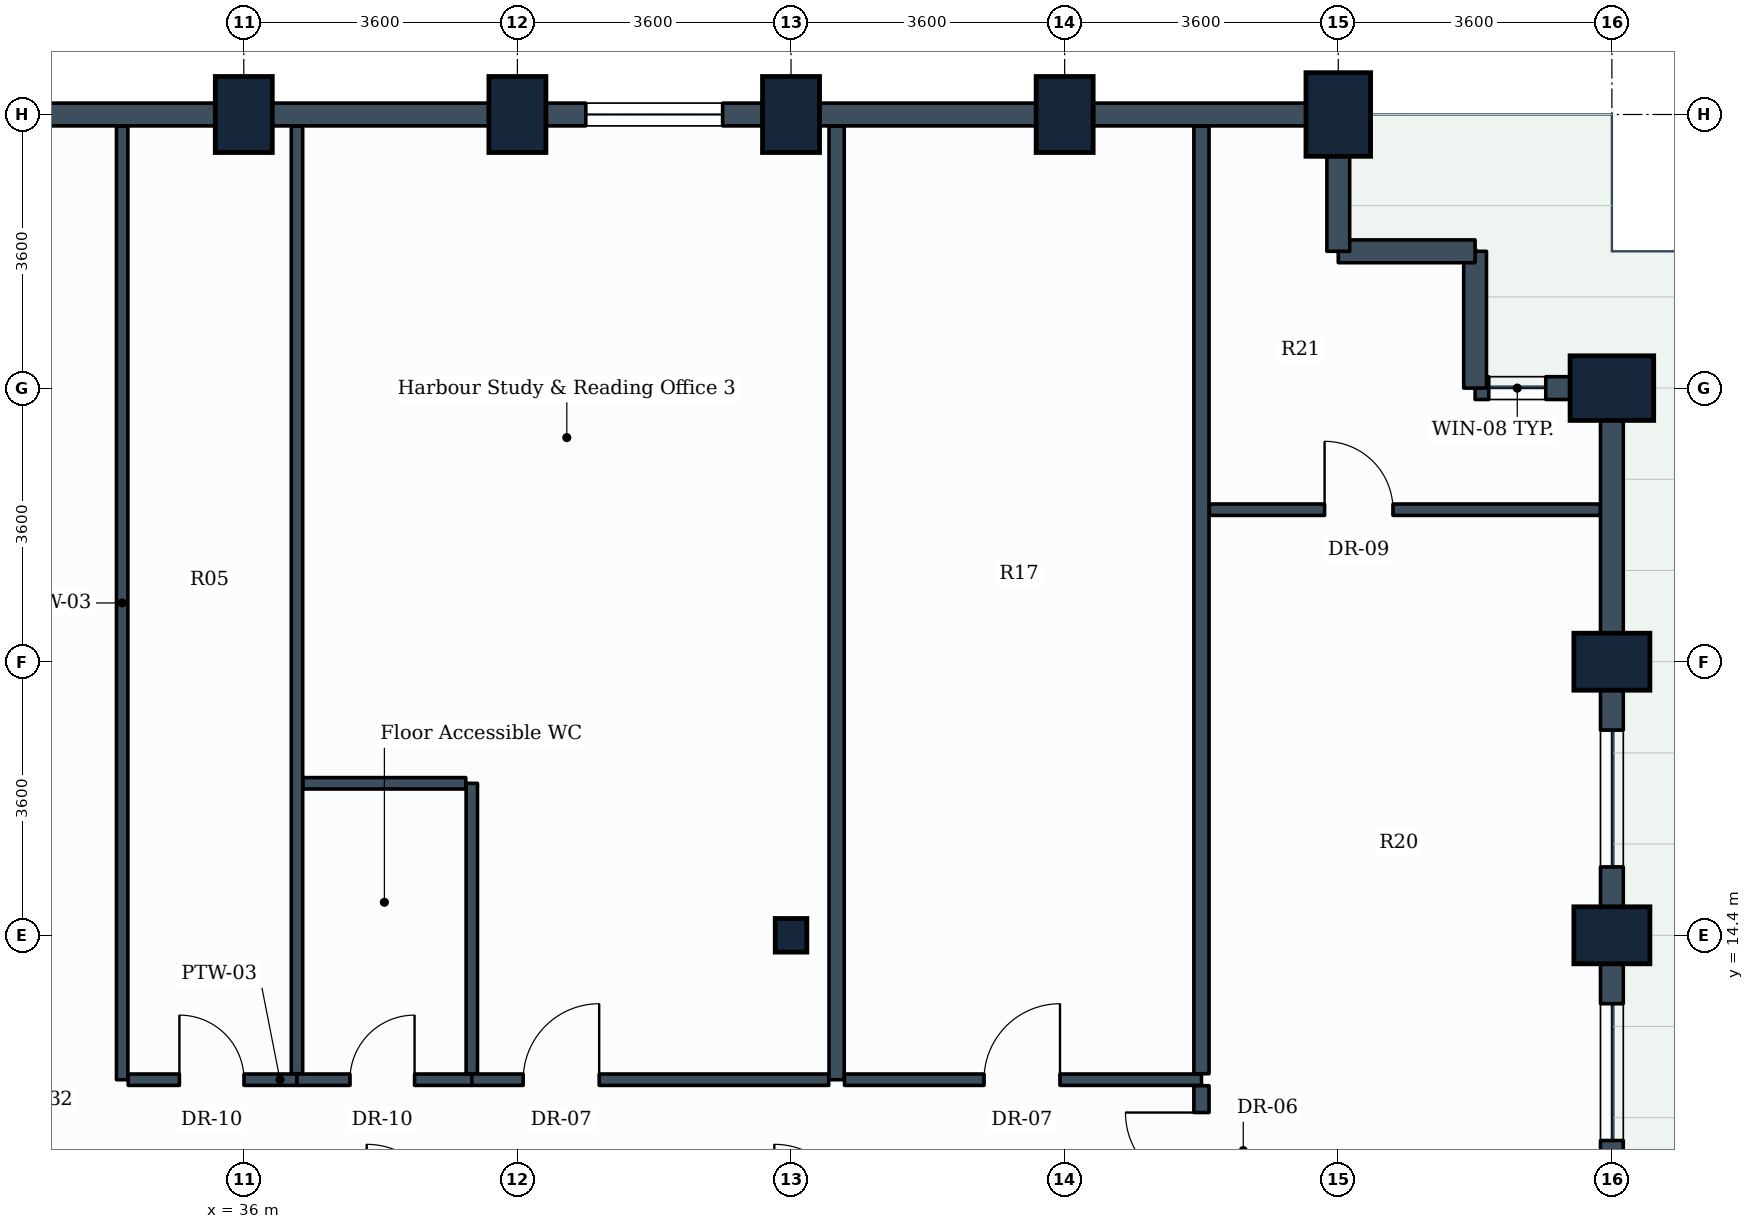
"""IFC4 building model, lengths in metres.
Left out: names, types, materials, properties, quantities, classifications, styles, units other than length and angle.
Written with IfcOpenShell. Run it as: python <this file> out.ifc"""

import sys

from ifc_helpers import new_model, si_unit, direction, frame, frame_2d, origin, origin_2d, place, context, subcontext, project, spatial, rectangle, i_section, extrude, element, fill, save


model = new_model("IFC4")
c1 = context("Model", 3, precision=1e-05, world=origin(), true_north=direction((0.0, 1.0)))
c2 = subcontext(c1, "Body", "Model", "MODEL_VIEW")
j1 = project(units=[si_unit("LENGTHUNIT", "METRE"), si_unit("PLANEANGLEUNIT", "RADIAN")], contexts=[c1])
p1 = place(None, origin())
s1 = spatial("IfcSite", under=j1, at=p1, CompositionType="ELEMENT")
p2 = place(p1, origin())
s2 = spatial("IfcBuilding", under=s1, at=p2, CompositionType="ELEMENT")
p3 = place(p2, frame((0.0, 0.0, 127.6)))
s3 = spatial("IfcBuildingStorey", under=s2, at=p3, CompositionType="ELEMENT", Elevation=127.6)
for number, where, z_axis, x_axis in (
    (1, (36.0, 25.2, 0.0), (0.0, 0.0, 1.0), (1.0, 0.0, 0.0)),
    (2, (39.6, 25.2, 0.0), (0.0, 0.0, 1.0), (1.0, 0.0, 0.0)),
):
    element("IfcColumn", number, at=place(p3, frame(where, z_axis=z_axis, x_axis=x_axis)), inside=s3, PredefinedType="COLUMN", context=c2, shape_type="SweptSolid", body=[
        extrude(rectangle(XDim=0.75, YDim=1.0, at=origin_2d()), origin(), (0.0, 0.0, 1.0), 3.8),
    ])
p4 = place(p3, frame((43.2, 14.4, 0.0), z_axis=(0.0, 0.0, 1.0), x_axis=(1.0, 0.0, 0.0)))
e3 = element("IfcColumn", 3, at=p4, inside=s3, PredefinedType="COLUMN", context=c2, shape_type="SweptSolid", body=[
    extrude(i_section(OverallWidth=0.416, OverallDepth=0.442, WebThickness=0.025, FlangeThickness=0.041, FilletRadius=0.015, at=origin_2d()), origin(), (0.0, 0.0, 1.0), 3.8),
])
for number, where, z_axis, x_axis in (
    (4, (43.2, 25.2, 0.0), (0.0, 0.0, 1.0), (1.0, 0.0, 0.0)),
    (5, (46.8, 25.2, 0.0), (0.0, 0.0, 1.0), (1.0, 0.0, 0.0)),
):
    element("IfcColumn", number, at=place(p3, frame(where, z_axis=z_axis, x_axis=x_axis)), inside=s3, PredefinedType="COLUMN", context=c2, shape_type="SweptSolid", body=[
        extrude(rectangle(XDim=0.75, YDim=1.0, at=origin_2d()), origin(), (0.0, 0.0, 1.0), 3.8),
    ])
p5 = place(p3, frame((50.4, 25.2, 0.0), z_axis=(0.0, 0.0, 1.0), x_axis=(1.0, 0.0, 0.0)))
e6 = element("IfcColumn", 6, at=p5, inside=s3, PredefinedType="COLUMN", context=c2, shape_type="SweptSolid", body=[
    extrude(rectangle(XDim=0.85, YDim=1.1, at=origin_2d()), origin(), (0.0, 0.0, 1.0), 3.8),
])
for number, where, z_axis, x_axis in (
    (7, (54.0, 14.4, 0.0), (0.0, 0.0, 1.0), (0.0, 1.0, 0.0)),
    (8, (54.0, 18.0, 0.0), (0.0, 0.0, 1.0), (0.0, 1.0, 0.0)),
):
    element("IfcColumn", number, at=place(p3, frame(where, z_axis=z_axis, x_axis=x_axis)), inside=s3, PredefinedType="COLUMN", context=c2, shape_type="SweptSolid", body=[
        extrude(rectangle(XDim=0.75, YDim=1.0, at=origin_2d()), origin(), (0.0, 0.0, 1.0), 3.8),
    ])
p6 = place(p3, frame((54.0, 21.6, 0.0), z_axis=(0.0, 0.0, 1.0), x_axis=(0.0, 1.0, 0.0)))
e9 = element("IfcColumn", 9, at=p6, inside=s3, PredefinedType="COLUMN", context=c2, shape_type="SweptSolid", body=[
    extrude(rectangle(XDim=0.85, YDim=1.1, at=origin_2d()), origin(), (0.0, 0.0, 1.0), 3.8),
])
p7 = place(p3, frame((54.0, 14.4, 0.0), z_axis=(0.0, 0.0, 1.0), x_axis=(0.0, -1.0, 0.0)))
e10 = element("IfcWall", 10, at=p7, inside=s3, PredefinedType="STANDARD", context=c2, shape_type="SweptSolid", body=[
    extrude(rectangle(XDim=3.6, YDim=0.3, at=frame_2d((1.8, 0.0))), origin(), (0.0, 0.0, 1.0), 2.93),
])
p8 = place(p7, frame((0.9, 0.0, 0.85)))
e11 = element("IfcOpeningElement", 11, at=p8, cuts=e10, PredefinedType="OPENING", context=c2, shape_type="SweptSolid", body=[
    extrude(rectangle(XDim=1.8, YDim=1.35, at=frame_2d((0.9, 0.675))), frame((0.0, 0.16, 0.0), z_axis=(0.0, -1.0, 0.0), x_axis=(1.0, 0.0, 0.0)), (0.0, 0.0, 1.0), 0.32),
])
p9 = place(p3, frame((54.0, 18.0, 0.0), z_axis=(0.0, 0.0, 1.0), x_axis=(0.0, -1.0, 0.0)))
e12 = element("IfcWall", 12, at=p9, inside=s3, PredefinedType="STANDARD", context=c2, shape_type="SweptSolid", body=[
    extrude(rectangle(XDim=3.6, YDim=0.3, at=frame_2d((1.8, 0.0))), origin(), (0.0, 0.0, 1.0), 2.93),
])
p10 = place(p9, frame((0.9, 0.0, 0.85)))
e13 = element("IfcOpeningElement", 13, at=p10, cuts=e12, PredefinedType="OPENING", context=c2, shape_type="SweptSolid", body=[
    extrude(rectangle(XDim=1.8, YDim=1.35, at=frame_2d((0.9, 0.675))), frame((0.0, 0.16, 0.0), z_axis=(0.0, -1.0, 0.0), x_axis=(1.0, 0.0, 0.0)), (0.0, 0.0, 1.0), 0.32),
])
p11 = place(p3, frame((54.0, 21.6, 0.0), z_axis=(0.0, 0.0, 1.0), x_axis=(0.0, -1.0, 0.0)))
e14 = element("IfcWall", 14, at=p11, inside=s3, PredefinedType="STANDARD", context=c2, shape_type="SweptSolid", body=[
    extrude(rectangle(XDim=3.6, YDim=0.3, at=frame_2d((1.8, 0.0))), origin(), (0.0, 0.0, 1.0), 2.93),
])
p12 = place(p3, frame((52.2, 21.6, 0.0), z_axis=(0.0, 0.0, 1.0), x_axis=(1.0, 0.0, 0.0)))
e15 = element("IfcWall", 15, at=p12, inside=s3, PredefinedType="STANDARD", context=c2, shape_type="SweptSolid", body=[
    extrude(rectangle(XDim=1.8, YDim=0.3, at=frame_2d((0.9, 0.0))), origin(), (0.0, 0.0, 1.0), 2.93),
])
p13 = place(p12, frame((0.18, 0.0, 0.85)))
e16 = element("IfcOpeningElement", 16, at=p13, cuts=e15, PredefinedType="OPENING", context=c2, shape_type="SweptSolid", body=[
    extrude(rectangle(XDim=0.75, YDim=1.05, at=frame_2d((0.375, 0.525))), frame((0.0, 0.16, 0.0), z_axis=(0.0, -1.0, 0.0), x_axis=(1.0, 0.0, 0.0)), (0.0, 0.0, 1.0), 0.32),
])
p14 = place(p3, frame((52.2, 23.4, 0.0), z_axis=(0.0, 0.0, 1.0), x_axis=(0.0, -1.0, 0.0)))
e17 = element("IfcWall", 17, at=p14, inside=s3, PredefinedType="STANDARD", context=c2, shape_type="SweptSolid", body=[
    extrude(rectangle(XDim=1.8, YDim=0.3, at=frame_2d((0.9, 0.0))), origin(), (0.0, 0.0, 1.0), 3.535),
])
p15 = place(p3, frame((50.4, 23.4, 0.0), z_axis=(0.0, 0.0, 1.0), x_axis=(1.0, 0.0, 0.0)))
e18 = element("IfcWall", 18, at=p15, inside=s3, PredefinedType="STANDARD", context=c2, shape_type="SweptSolid", body=[
    extrude(rectangle(XDim=1.8, YDim=0.3, at=frame_2d((0.9, 0.0))), origin(), (0.0, 0.0, 1.0), 3.535),
])
p16 = place(p3, frame((50.4, 25.2, 0.0), z_axis=(0.0, 0.0, 1.0), x_axis=(0.0, -1.0, 0.0)))
e19 = element("IfcWall", 19, at=p16, inside=s3, PredefinedType="STANDARD", context=c2, shape_type="SweptSolid", body=[
    extrude(rectangle(XDim=1.8, YDim=0.3, at=frame_2d((0.9, 0.0))), origin(), (0.0, 0.0, 1.0), 2.93),
])
p17 = place(p3, frame((46.8, 25.2, 0.0), z_axis=(0.0, 0.0, 1.0), x_axis=(1.0, 0.0, 0.0)))
e20 = element("IfcWall", 20, at=p17, inside=s3, PredefinedType="STANDARD", context=c2, shape_type="SweptSolid", body=[
    extrude(rectangle(XDim=3.6, YDim=0.3, at=frame_2d((1.8, 0.0))), origin(), (0.0, 0.0, 1.0), 2.93),
])
p18 = place(p3, frame((43.2, 25.2, 0.0), z_axis=(0.0, 0.0, 1.0), x_axis=(1.0, 0.0, 0.0)))
e21 = element("IfcWall", 21, at=p18, inside=s3, PredefinedType="STANDARD", context=c2, shape_type="SweptSolid", body=[
    extrude(rectangle(XDim=3.6, YDim=0.3, at=frame_2d((1.8, 0.0))), origin(), (0.0, 0.0, 1.0), 2.93),
])
p19 = place(p3, frame((39.6, 25.2, 0.0), z_axis=(0.0, 0.0, 1.0), x_axis=(1.0, 0.0, 0.0)))
e22 = element("IfcWall", 22, at=p19, inside=s3, PredefinedType="STANDARD", context=c2, shape_type="SweptSolid", body=[
    extrude(rectangle(XDim=3.6, YDim=0.3, at=frame_2d((1.8, 0.0))), origin(), (0.0, 0.0, 1.0), 2.93),
])
p20 = place(p19, frame((0.9, 0.0, 0.85)))
e23 = element("IfcOpeningElement", 23, at=p20, cuts=e22, PredefinedType="OPENING", context=c2, shape_type="SweptSolid", body=[
    extrude(rectangle(XDim=1.8, YDim=1.35, at=frame_2d((0.9, 0.675))), frame((0.0, 0.16, 0.0), z_axis=(0.0, -1.0, 0.0), x_axis=(1.0, 0.0, 0.0)), (0.0, 0.0, 1.0), 0.32),
])
for number, where, z_axis, x_axis in (
    (24, (36.0, 25.2, 0.0), (0.0, 0.0, 1.0), (1.0, 0.0, 0.0)),
    (25, (32.4, 25.2, 0.0), (0.0, 0.0, 1.0), (1.0, 0.0, 0.0)),
):
    element("IfcWall", number, at=place(p3, frame(where, z_axis=z_axis, x_axis=x_axis)), inside=s3, PredefinedType="STANDARD", context=c2, shape_type="SweptSolid", body=[
        extrude(rectangle(XDim=3.6, YDim=0.3, at=frame_2d((1.8, 0.0))), origin(), (0.0, 0.0, 1.0), 2.93),
    ])
p21 = place(p3, frame((34.4, 12.5, 0.0), z_axis=(0.0, 0.0, 1.0), x_axis=(0.0, 1.0, 0.0)))
e26 = element("IfcWall", 26, at=p21, inside=s3, PredefinedType="PARTITIONING", context=c2, shape_type="SweptSolid", body=[
    extrude(rectangle(XDim=12.546, YDim=0.15, at=frame_2d((6.273, 0.0))), origin(), (0.0, 0.0, 1.0), 2.93),
])
p22 = place(p3, frame((34.479, 12.5, 0.0), z_axis=(0.0, 0.0, 1.0), x_axis=(1.0, 0.0, 0.0)))
e27 = element("IfcWall", 27, at=p22, inside=s3, PredefinedType="PARTITIONING", context=c2, shape_type="SweptSolid", body=[
    extrude(rectangle(XDim=2.221, YDim=0.15, at=frame_2d((1.11, 0.0))), origin(), (0.0, 0.0, 1.0), 3.22),
])
p23 = place(p22, frame((0.674, 0.0, 0.0)))
e28 = element("IfcOpeningElement", 28, at=p23, cuts=e27, PredefinedType="OPENING", context=c2, shape_type="SweptSolid", body=[
    extrude(rectangle(XDim=0.85, YDim=2.1, at=frame_2d((0.425, 1.05))), frame((0.0, 0.085, 0.0), z_axis=(0.0, -1.0, 0.0), x_axis=(1.0, 0.0, 0.0)), (0.0, 0.0, 1.0), 0.17),
])
p24 = place(p3, frame((36.7, 12.579, 0.0), z_axis=(0.0, 0.0, 1.0), x_axis=(0.0, 1.0, 0.0)))
e29 = element("IfcWall", 29, at=p24, inside=s3, PredefinedType="PARTITIONING", context=c2, shape_type="SweptSolid", body=[
    extrude(rectangle(XDim=12.467, YDim=0.15, at=frame_2d((6.233, 0.0))), origin(), (0.0, 0.0, 1.0), 2.93),
])
p25 = place(p3, frame((36.7, 12.5, 0.0), z_axis=(0.0, 0.0, 1.0), x_axis=(1.0, 0.0, 0.0)))
e30 = element("IfcWall", 30, at=p25, inside=s3, PredefinedType="PARTITIONING", context=c2, shape_type="SweptSolid", body=[
    extrude(rectangle(XDim=2.3, YDim=0.15, at=frame_2d((1.15, 0.0))), origin(), (0.0, 0.0, 1.0), 3.535),
])
p26 = place(p25, frame((0.697, 0.0, 0.0)))
e31 = element("IfcOpeningElement", 31, at=p26, cuts=e30, PredefinedType="OPENING", context=c2, shape_type="SweptSolid", body=[
    extrude(rectangle(XDim=0.85, YDim=2.1, at=frame_2d((0.425, 1.05))), frame((0.0, 0.085, 0.0), z_axis=(0.0, -1.0, 0.0), x_axis=(1.0, 0.0, 0.0)), (0.0, 0.0, 1.0), 0.17),
])
p27 = place(p3, frame((39.0, 12.579, 0.0), z_axis=(0.0, 0.0, 1.0), x_axis=(0.0, 1.0, 0.0)))
e32 = element("IfcWall", 32, at=p27, inside=s3, PredefinedType="PARTITIONING", context=c2, shape_type="SweptSolid", body=[
    extrude(rectangle(XDim=3.821, YDim=0.15, at=frame_2d((1.91, 0.0))), origin(), (0.0, 0.0, 1.0), 3.17),
])
p28 = place(p3, frame((36.779, 16.4, 0.0), z_axis=(0.0, 0.0, 1.0), x_axis=(1.0, 0.0, 0.0)))
e33 = element("IfcWall", 33, at=p28, inside=s3, PredefinedType="PARTITIONING", context=c2, shape_type="SweptSolid", body=[
    extrude(rectangle(XDim=2.142, YDim=0.15, at=frame_2d((1.071, 0.0))), origin(), (0.0, 0.0, 1.0), 3.535),
])
p29 = place(p3, frame((43.8, 12.5, 0.0), z_axis=(0.0, 0.0, 1.0), x_axis=(0.0, 1.0, 0.0)))
e34 = element("IfcWall", 34, at=p29, inside=s3, PredefinedType="PARTITIONING", context=c2, shape_type="SweptSolid", body=[
    extrude(rectangle(XDim=12.546, YDim=0.2, at=frame_2d((6.273, 0.0))), origin(), (0.0, 0.0, 1.0), 2.93),
])
p30 = place(p3, frame((39.0, 12.5, 0.0), z_axis=(0.0, 0.0, 1.0), x_axis=(1.0, 0.0, 0.0)))
e35 = element("IfcWall", 35, at=p30, inside=s3, PredefinedType="PARTITIONING", context=c2, shape_type="SweptSolid", body=[
    extrude(rectangle(XDim=4.696, YDim=0.15, at=frame_2d((2.348, 0.0))), origin(), (0.0, 0.0, 1.0), 3.17),
])
p31 = place(p30, frame((0.676, 0.0, 0.0)))
e36 = element("IfcOpeningElement", 36, at=p31, cuts=e35, PredefinedType="OPENING", context=c2, shape_type="SweptSolid", body=[
    extrude(rectangle(XDim=1.0, YDim=2.1, at=frame_2d((0.5, 1.05))), frame((0.0, 0.085, 0.0), z_axis=(0.0, -1.0, 0.0), x_axis=(1.0, 0.0, 0.0)), (0.0, 0.0, 1.0), 0.17),
])
p32 = place(p3, frame((43.904, 12.5, 0.0), z_axis=(0.0, 0.0, 1.0), x_axis=(1.0, 0.0, 0.0)))
e37 = element("IfcWall", 37, at=p32, inside=s3, PredefinedType="PARTITIONING", context=c2, shape_type="SweptSolid", body=[
    extrude(rectangle(XDim=4.696, YDim=0.15, at=frame_2d((2.348, 0.0))), origin(), (0.0, 0.0, 1.0), 3.17),
])
p33 = place(p32, frame((1.835, 0.0, 0.0)))
e38 = element("IfcOpeningElement", 38, at=p33, cuts=e37, PredefinedType="OPENING", context=c2, shape_type="SweptSolid", body=[
    extrude(rectangle(XDim=1.0, YDim=2.1, at=frame_2d((0.5, 1.05))), frame((0.0, 0.085, 0.0), z_axis=(0.0, -1.0, 0.0), x_axis=(1.0, 0.0, 0.0)), (0.0, 0.0, 1.0), 0.17),
])
p34 = place(p3, frame((48.6, 12.579, 0.0), z_axis=(0.0, 0.0, 1.0), x_axis=(0.0, 1.0, 0.0)))
e39 = element("IfcWall", 39, at=p34, inside=s3, PredefinedType="PARTITIONING", context=c2, shape_type="SweptSolid", body=[
    extrude(rectangle(XDim=12.467, YDim=0.2, at=frame_2d((6.233, 0.0))), origin(), (0.0, 0.0, 1.0), 2.93),
])
p35 = place(p3, frame((48.6, 10.754, 0.0), z_axis=(0.0, 0.0, 1.0), x_axis=(0.0, 1.0, 0.0)))
e40 = element("IfcWall", 40, at=p35, inside=s3, PredefinedType="PARTITIONING", context=c2, shape_type="SweptSolid", body=[
    extrude(rectangle(XDim=1.667, YDim=0.2, at=frame_2d((0.833, 0.0))), origin(), (0.0, 0.0, 1.0), 3.535),
])
p36 = place(p35, frame((0.314, 0.0, 0.0)))
e41 = element("IfcOpeningElement", 41, at=p36, cuts=e40, PredefinedType="OPENING", context=c2, shape_type="SweptSolid", body=[
    extrude(rectangle(XDim=1.0, YDim=2.1, at=frame_2d((0.5, 1.05))), frame((0.0, 0.11, 0.0), z_axis=(0.0, -1.0, 0.0), x_axis=(1.0, 0.0, 0.0)), (0.0, 0.0, 1.0), 0.22),
])
p37 = place(p3, frame((48.704, 20.0, 0.0), z_axis=(0.0, 0.0, 1.0), x_axis=(1.0, 0.0, 0.0)))
e42 = element("IfcWall", 42, at=p37, inside=s3, PredefinedType="PARTITIONING", context=c2, shape_type="SweptSolid", body=[
    extrude(rectangle(XDim=5.142, YDim=0.15, at=frame_2d((2.571, 0.0))), origin(), (0.0, 0.0, 1.0), 2.93),
])
p38 = place(p37, frame((1.516, 0.0, 0.0)))
e43 = element("IfcOpeningElement", 43, at=p38, cuts=e42, PredefinedType="OPENING", context=c2, shape_type="SweptSolid", body=[
    extrude(rectangle(XDim=0.9, YDim=2.1, at=frame_2d((0.45, 1.05))), frame((0.0, 0.085, 0.0), z_axis=(0.0, -1.0, 0.0), x_axis=(1.0, 0.0, 0.0)), (0.0, 0.0, 1.0), 0.17),
])
p39 = place(p8, origin())
e44 = element("IfcWindow", 44, at=p39, inside=s3, PartitioningType="SINGLE_PANEL", PredefinedType="WINDOW", context=c2, shape_type="SweptSolid", body=[
    extrude(rectangle(XDim=1.8, YDim=1.35, at=frame_2d((0.9, 0.675))), frame((0.0, 0.03, 0.0), z_axis=(0.0, -1.0, 0.0), x_axis=(1.0, 0.0, 0.0)), (0.0, 0.0, 1.0), 0.06),
])
fill(e11, e44)
p40 = place(p10, origin())
e45 = element("IfcWindow", 45, at=p40, inside=s3, PartitioningType="SINGLE_PANEL", PredefinedType="WINDOW", context=c2, shape_type="SweptSolid", body=[
    extrude(rectangle(XDim=1.8, YDim=1.35, at=frame_2d((0.9, 0.675))), frame((0.0, 0.03, 0.0), z_axis=(0.0, -1.0, 0.0), x_axis=(1.0, 0.0, 0.0)), (0.0, 0.0, 1.0), 0.06),
])
fill(e13, e45)
p41 = place(p20, origin())
e46 = element("IfcWindow", 46, at=p41, inside=s3, PartitioningType="SINGLE_PANEL", PredefinedType="WINDOW", context=c2, shape_type="SweptSolid", body=[
    extrude(rectangle(XDim=1.8, YDim=1.35, at=frame_2d((0.9, 0.675))), frame((0.0, 0.03, 0.0), z_axis=(0.0, -1.0, 0.0), x_axis=(1.0, 0.0, 0.0)), (0.0, 0.0, 1.0), 0.06),
])
fill(e23, e46)
p42 = place(p23, origin())
e47 = element("IfcDoor", 47, at=p42, inside=s3, OperationType="SINGLE_SWING_LEFT", PredefinedType="DOOR", context=c2, shape_type="SweptSolid", body=[
    extrude(rectangle(XDim=0.85, YDim=2.1, at=frame_2d((0.425, 1.05))), frame((0.0, 0.025, 0.0), z_axis=(0.0, -1.0, 0.0), x_axis=(1.0, 0.0, 0.0)), (0.0, 0.0, 1.0), 0.05),
])
fill(e28, e47)
p43 = place(p26, origin())
e48 = element("IfcDoor", 48, at=p43, inside=s3, OperationType="SINGLE_SWING_RIGHT", PredefinedType="DOOR", context=c2, shape_type="SweptSolid", body=[
    extrude(rectangle(XDim=0.85, YDim=2.1, at=frame_2d((0.425, 1.05))), frame((0.0, 0.025, 0.0), z_axis=(0.0, -1.0, 0.0), x_axis=(1.0, 0.0, 0.0)), (0.0, 0.0, 1.0), 0.05),
])
fill(e31, e48)
p44 = place(p31, origin())
e49 = element("IfcDoor", 49, at=p44, inside=s3, OperationType="SINGLE_SWING_RIGHT", PredefinedType="DOOR", context=c2, shape_type="SweptSolid", body=[
    extrude(rectangle(XDim=1.0, YDim=2.1, at=frame_2d((0.5, 1.05))), frame((0.0, 0.025, 0.0), z_axis=(0.0, -1.0, 0.0), x_axis=(1.0, 0.0, 0.0)), (0.0, 0.0, 1.0), 0.05),
])
fill(e36, e49)
p45 = place(p33, origin())
e50 = element("IfcDoor", 50, at=p45, inside=s3, OperationType="SINGLE_SWING_RIGHT", PredefinedType="DOOR", context=c2, shape_type="SweptSolid", body=[
    extrude(rectangle(XDim=1.0, YDim=2.1, at=frame_2d((0.5, 1.05))), frame((0.0, 0.025, 0.0), z_axis=(0.0, -1.0, 0.0), x_axis=(1.0, 0.0, 0.0)), (0.0, 0.0, 1.0), 0.05),
])
fill(e38, e50)
p46 = place(p36, origin())
e51 = element("IfcDoor", 51, at=p46, inside=s3, OperationType="SINGLE_SWING_RIGHT", PredefinedType="DOOR", context=c2, shape_type="SweptSolid", body=[
    extrude(rectangle(XDim=1.0, YDim=2.1, at=frame_2d((0.5, 1.05))), frame((0.0, 0.025, 0.0), z_axis=(0.0, -1.0, 0.0), x_axis=(1.0, 0.0, 0.0)), (0.0, 0.0, 1.0), 0.05),
])
fill(e41, e51)
p47 = place(p38, origin())
e52 = element("IfcDoor", 52, at=p47, inside=s3, OperationType="SINGLE_SWING_LEFT", PredefinedType="DOOR", context=c2, shape_type="SweptSolid", body=[
    extrude(rectangle(XDim=0.9, YDim=2.1, at=frame_2d((0.45, 1.05))), frame((0.0, 0.025, 0.0), z_axis=(0.0, -1.0, 0.0), x_axis=(1.0, 0.0, 0.0)), (0.0, 0.0, 1.0), 0.05),
])
fill(e43, e52)
p48 = place(p13, origin())
e53 = element("IfcWindow", 53, at=p48, inside=s3, PartitioningType="SINGLE_PANEL", PredefinedType="WINDOW", context=c2, shape_type="SweptSolid", body=[
    extrude(rectangle(XDim=0.75, YDim=1.05, at=frame_2d((0.375, 0.525))), frame((0.0, 0.03, 0.0), z_axis=(0.0, -1.0, 0.0), x_axis=(1.0, 0.0, 0.0)), (0.0, 0.0, 1.0), 0.06),
])
fill(e16, e53)
save(model, sys.argv[1])
